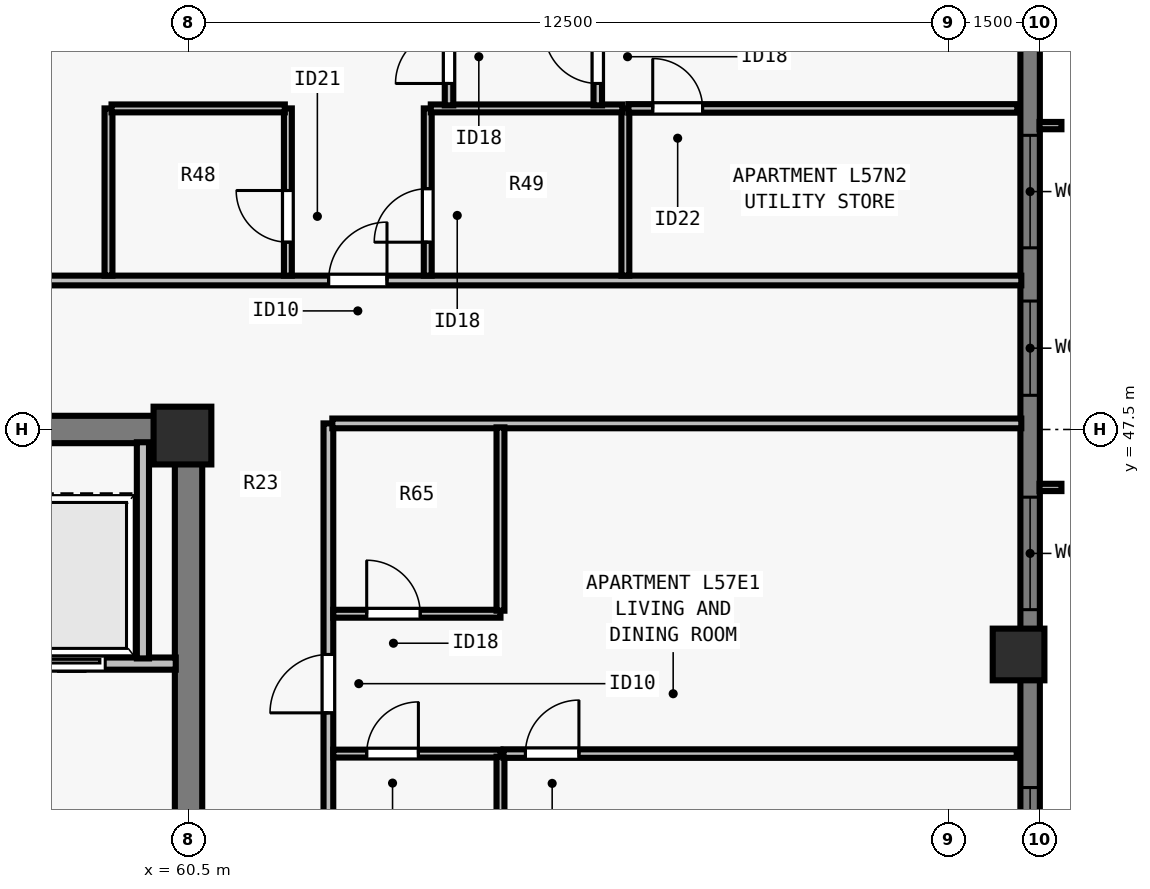
"""IFC4 building model, lengths in metres.
Left out: names, types, materials, properties, quantities, classifications, styles, units other than length and angle.
Written with IfcOpenShell. Run it as: python <this file> out.ifc"""

import sys

from ifc_helpers import new_model, si_unit, direction, frame, frame_2d, origin, origin_2d, place, context, subcontext, project, spatial, rectangle, extrude, element, fill, save


model = new_model("IFC4")
c1 = context("Model", 3, precision=1e-05, world=origin(), true_north=direction((0.0, 1.0)))
c2 = subcontext(c1, "Body", "Model", "MODEL_VIEW")
j1 = project(units=[si_unit("LENGTHUNIT", "METRE"), si_unit("PLANEANGLEUNIT", "RADIAN")], contexts=[c1])
p1 = place(None, origin())
s1 = spatial("IfcSite", under=j1, at=p1, CompositionType="ELEMENT")
p2 = place(p1, origin())
s2 = spatial("IfcBuilding", under=s1, at=p2, CompositionType="ELEMENT")
p3 = place(p2, frame((0.0, 0.0, 209.5)))
s3 = spatial("IfcBuildingStorey", under=s2, at=p3, CompositionType="ELEMENT", Elevation=209.5)
p4 = place(p3, frame((60.4, 47.4, 0.0), z_axis=(0.0, 0.0, 1.0), x_axis=(1.0, 0.0, 0.0)))
e1 = element("IfcColumn", 1, at=p4, inside=s3, PredefinedType="COLUMN", context=c2, shape_type="SweptSolid", body=[
    extrude(rectangle(XDim=0.95, YDim=0.95, at=origin_2d()), origin(), (0.0, 0.0, 1.0), 3.5),
])
p5 = place(p3, frame((74.15, 43.8, 0.0), z_axis=(0.0, 0.0, 1.0), x_axis=(0.0, 1.0, 0.0)))
e2 = element("IfcColumn", 2, at=p5, inside=s3, PredefinedType="COLUMN", context=c2, shape_type="SweptSolid", body=[
    extrude(rectangle(XDim=0.85, YDim=0.85, at=origin_2d()), origin(), (0.0, 0.0, 1.0), 3.5),
])
p6 = place(p3, frame((74.34, 56.5, 0.0), z_axis=(0.0, 0.0, 1.0), x_axis=(0.0, -1.0, 0.0)))
e3 = element("IfcWall", 3, at=p6, inside=s3, PredefinedType="SOLIDWALL", context=c2, shape_type="SweptSolid", body=[
    extrude(rectangle(XDim=34.702, YDim=0.32, at=frame_2d((17.351, 0.0))), origin(), (0.0, 0.0, 1.0), 3.29),
])
p7 = place(p6, frame((4.163, 0.0, 0.8)))
e4 = element("IfcOpeningElement", 4, at=p7, cuts=e3, PredefinedType="OPENING", context=c2, shape_type="SweptSolid", body=[
    extrude(rectangle(XDim=1.85, YDim=1.678, at=frame_2d((0.925, 0.839))), frame((0.0, 0.17, 0.0), z_axis=(0.0, -1.0, 0.0), x_axis=(1.0, 0.0, 0.0)), (0.0, 0.0, 1.0), 0.34),
])
p8 = place(p6, frame((6.888, 0.0, 0.8)))
e5 = element("IfcOpeningElement", 5, at=p8, cuts=e3, PredefinedType="OPENING", context=c2, shape_type="SweptSolid", body=[
    extrude(rectangle(XDim=1.55, YDim=1.678, at=frame_2d((0.775, 0.839))), frame((0.0, 0.17, 0.0), z_axis=(0.0, -1.0, 0.0), x_axis=(1.0, 0.0, 0.0)), (0.0, 0.0, 1.0), 0.34),
])
p9 = place(p6, frame((10.113, 0.0, 0.8)))
e6 = element("IfcOpeningElement", 6, at=p9, cuts=e3, PredefinedType="OPENING", context=c2, shape_type="SweptSolid", body=[
    extrude(rectangle(XDim=1.85, YDim=1.678, at=frame_2d((0.925, 0.839))), frame((0.0, 0.17, 0.0), z_axis=(0.0, -1.0, 0.0), x_axis=(1.0, 0.0, 0.0)), (0.0, 0.0, 1.0), 0.34),
])
p10 = place(p6, frame((14.888, 0.0, 0.8)))
e7 = element("IfcOpeningElement", 7, at=p10, cuts=e3, PredefinedType="OPENING", context=c2, shape_type="SweptSolid", body=[
    extrude(rectangle(XDim=1.55, YDim=1.678, at=frame_2d((0.775, 0.839))), frame((0.0, 0.17, 0.0), z_axis=(0.0, -1.0, 0.0), x_axis=(1.0, 0.0, 0.0)), (0.0, 0.0, 1.0), 0.34),
])
p11 = place(p6, frame((18.114, 0.0, 0.8)))
e8 = element("IfcOpeningElement", 8, at=p11, cuts=e3, PredefinedType="OPENING", context=c2, shape_type="SweptSolid", body=[
    extrude(rectangle(XDim=1.85, YDim=1.678, at=frame_2d((0.925, 0.839))), frame((0.0, 0.17, 0.0), z_axis=(0.0, -1.0, 0.0), x_axis=(1.0, 0.0, 0.0)), (0.0, 0.0, 1.0), 0.34),
])
p12 = place(p6, frame((23.614, 0.0, 0.8)))
e9 = element("IfcOpeningElement", 9, at=p12, cuts=e3, PredefinedType="OPENING", context=c2, shape_type="SweptSolid", body=[
    extrude(rectangle(XDim=1.85, YDim=1.678, at=frame_2d((0.925, 0.839))), frame((0.0, 0.17, 0.0), z_axis=(0.0, -1.0, 0.0), x_axis=(1.0, 0.0, 0.0)), (0.0, 0.0, 1.0), 0.34),
])
p13 = place(p6, frame((28.839, 0.0, 0.8)))
e10 = element("IfcOpeningElement", 10, at=p13, cuts=e3, PredefinedType="OPENING", context=c2, shape_type="SweptSolid", body=[
    extrude(rectangle(XDim=1.55, YDim=1.678, at=frame_2d((0.775, 0.839))), frame((0.0, 0.17, 0.0), z_axis=(0.0, -1.0, 0.0), x_axis=(1.0, 0.0, 0.0)), (0.0, 0.0, 1.0), 0.34),
])
p14 = place(p3, frame((43.275, 47.5, 0.0), z_axis=(0.0, 0.0, 1.0), x_axis=(1.0, 0.0, 0.0)))
e11 = element("IfcWall", 11, at=p14, inside=s3, PredefinedType="SHEAR", context=c2, shape_type="SweptSolid", body=[
    extrude(rectangle(XDim=17.45, YDim=0.45, at=frame_2d((8.725, 0.0))), origin(), (0.0, 0.0, 1.0), 3.29),
])
p15 = place(p3, frame((60.5, 40.8, 0.0), z_axis=(0.0, 0.0, 1.0), x_axis=(0.0, 1.0, 0.0)))
e12 = element("IfcWall", 12, at=p15, inside=s3, PredefinedType="SHEAR", context=c2, shape_type="SweptSolid", body=[
    extrude(rectangle(XDim=6.485, YDim=0.45, at=frame_2d((3.242, 0.0))), origin(), (0.0, 0.0, 1.0), 3.29),
])
p16 = place(p3, frame((56.735, 43.65, 0.0), z_axis=(0.0, 0.0, 1.0), x_axis=(1.0, 0.0, 0.0)))
e13 = element("IfcWall", 13, at=p16, inside=s3, PredefinedType="SOLIDWALL", context=c2, shape_type="SweptSolid", body=[
    extrude(rectangle(XDim=3.555, YDim=0.2, at=frame_2d((1.777, 0.0))), origin(), (0.0, 0.0, 1.0), 3.29),
])
p17 = place(p16, frame((1.295, 0.0, 0.0)))
e14 = element("IfcOpeningElement", 14, at=p17, cuts=e13, PredefinedType="OPENING", context=c2, shape_type="SweptSolid", body=[
    extrude(rectangle(XDim=1.1, YDim=2.2, at=frame_2d((0.55, 1.1))), frame((0.0, 0.11, 0.0), z_axis=(0.0, -1.0, 0.0), x_axis=(1.0, 0.0, 0.0)), (0.0, 0.0, 1.0), 0.22),
])
p18 = place(p3, frame((59.75, 43.735, 0.0), z_axis=(0.0, 0.0, 1.0), x_axis=(0.0, 1.0, 0.0)))
e15 = element("IfcWall", 15, at=p18, inside=s3, PredefinedType="SOLIDWALL", context=c2, shape_type="SweptSolid", body=[
    extrude(rectangle(XDim=3.555, YDim=0.2, at=frame_2d((1.777, 0.0))), origin(), (0.0, 0.0, 1.0), 3.29),
])
p19 = place(p3, frame((29.805, 49.95, 0.0), z_axis=(0.0, 0.0, 1.0), x_axis=(1.0, 0.0, 0.0)))
e16 = element("IfcWall", 16, at=p19, inside=s3, PredefinedType="PARTITIONING", context=c2, shape_type="SweptSolid", body=[
    extrude(rectangle(XDim=44.39, YDim=0.16, at=frame_2d((22.195, 0.0))), origin(), (0.0, 0.0, 1.0), 2.958),
])
p20 = place(p19, frame((10.919, 0.0, 0.0)))
e17 = element("IfcOpeningElement", 17, at=p20, cuts=e16, PredefinedType="OPENING", context=c2, shape_type="SweptSolid", body=[
    extrude(rectangle(XDim=0.96, YDim=2.18, at=frame_2d((0.48, 1.09))), frame((0.0, 0.09, 0.0), z_axis=(0.0, -1.0, 0.0), x_axis=(1.0, 0.0, 0.0)), (0.0, 0.0, 1.0), 0.18),
])
p21 = place(p19, frame((32.999, 0.0, 0.0)))
e18 = element("IfcOpeningElement", 18, at=p21, cuts=e16, PredefinedType="OPENING", context=c2, shape_type="SweptSolid", body=[
    extrude(rectangle(XDim=0.96, YDim=2.18, at=frame_2d((0.48, 1.09))), frame((0.0, 0.09, 0.0), z_axis=(0.0, -1.0, 0.0), x_axis=(1.0, 0.0, 0.0)), (0.0, 0.0, 1.0), 0.18),
])
p22 = place(p3, frame((62.8, 30.4, 0.0), z_axis=(0.0, 0.0, 1.0), x_axis=(0.0, 1.0, 0.0)))
e19 = element("IfcWall", 19, at=p22, inside=s3, PredefinedType="PARTITIONING", context=c2, shape_type="SweptSolid", body=[
    extrude(rectangle(XDim=17.2, YDim=0.16, at=frame_2d((8.6, 0.0))), origin(), (0.0, 0.0, 1.0), 3.29),
])
p23 = place(p22, frame((3.6, 0.0, 0.0)))
e20 = element("IfcOpeningElement", 20, at=p23, cuts=e19, PredefinedType="OPENING", context=c2, shape_type="SweptSolid", body=[
    extrude(rectangle(XDim=0.96, YDim=2.12, at=frame_2d((0.48, 1.06))), frame((0.0, 0.09, 0.0), z_axis=(0.0, -1.0, 0.0), x_axis=(1.0, 0.0, 0.0)), (0.0, 0.0, 1.0), 0.18),
])
p24 = place(p22, frame((12.44, 0.0, 0.0)))
e21 = element("IfcOpeningElement", 21, at=p24, cuts=e19, PredefinedType="OPENING", context=c2, shape_type="SweptSolid", body=[
    extrude(rectangle(XDim=0.96, YDim=2.18, at=frame_2d((0.48, 1.09))), frame((0.0, 0.09, 0.0), z_axis=(0.0, -1.0, 0.0), x_axis=(1.0, 0.0, 0.0)), (0.0, 0.0, 1.0), 0.18),
])
p25 = place(p3, frame((62.865, 47.6, 0.0), z_axis=(0.0, 0.0, 1.0), x_axis=(1.0, 0.0, 0.0)))
e22 = element("IfcWall", 22, at=p25, inside=s3, PredefinedType="PARTITIONING", context=c2, shape_type="SweptSolid", body=[
    extrude(rectangle(XDim=11.33, YDim=0.16, at=frame_2d((5.665, 0.0))), origin(), (0.0, 0.0, 1.0), 3.29),
])
p26 = place(p3, frame((59.184, 50.03, 0.0), z_axis=(0.0, 0.0, 1.0), x_axis=(0.0, 1.0, 0.0)))
e23 = element("IfcWall", 23, at=p26, inside=s3, PredefinedType="PLUMBINGWALL", context=c2, shape_type="SweptSolid", body=[
    extrude(rectangle(XDim=2.75, YDim=0.13, at=frame_2d((1.375, 0.0))), origin(), (0.0, 0.0, 1.0), 3.29),
])
p27 = place(p3, frame((62.134, 50.03, 0.0), z_axis=(0.0, 0.0, 1.0), x_axis=(0.0, 1.0, 0.0)))
e24 = element("IfcWall", 24, at=p27, inside=s3, PredefinedType="PLUMBINGWALL", context=c2, shape_type="SweptSolid", body=[
    extrude(rectangle(XDim=2.75, YDim=0.13, at=frame_2d((1.375, 0.0))), origin(), (0.0, 0.0, 1.0), 2.573),
])
p28 = place(p27, frame((0.55, 0.0, 0.0)))
e25 = element("IfcOpeningElement", 25, at=p28, cuts=e24, PredefinedType="OPENING", context=c2, shape_type="SweptSolid", body=[
    extrude(rectangle(XDim=0.85, YDim=2.08, at=frame_2d((0.425, 1.04))), frame((0.0, 0.075, 0.0), z_axis=(0.0, -1.0, 0.0), x_axis=(1.0, 0.0, 0.0)), (0.0, 0.0, 1.0), 0.15),
])
p29 = place(p3, frame((59.234, 52.78, 0.0), z_axis=(0.0, 0.0, 1.0), x_axis=(1.0, 0.0, 0.0)))
e26 = element("IfcWall", 26, at=p29, inside=s3, PredefinedType="PLUMBINGWALL", context=c2, shape_type="SweptSolid", body=[
    extrude(rectangle(XDim=2.85, YDim=0.13, at=frame_2d((1.425, 0.0))), origin(), (0.0, 0.0, 1.0), 3.29),
])
p30 = place(p3, frame((67.684, 50.03, 0.0), z_axis=(0.0, 0.0, 1.0), x_axis=(0.0, 1.0, 0.0)))
e27 = element("IfcWall", 27, at=p30, inside=s3, PredefinedType="PLUMBINGWALL", context=c2, shape_type="SweptSolid", body=[
    extrude(rectangle(XDim=2.75, YDim=0.13, at=frame_2d((1.375, 0.0))), origin(), (0.0, 0.0, 1.0), 3.29),
])
p31 = place(p3, frame((64.434, 50.03, 0.0), z_axis=(0.0, 0.0, 1.0), x_axis=(0.0, 1.0, 0.0)))
e28 = element("IfcWall", 28, at=p31, inside=s3, PredefinedType="PLUMBINGWALL", context=c2, shape_type="SweptSolid", body=[
    extrude(rectangle(XDim=2.75, YDim=0.13, at=frame_2d((1.375, 0.0))), origin(), (0.0, 0.0, 1.0), 3.29),
])
p32 = place(p31, frame((0.55, 0.0, 0.0)))
e29 = element("IfcOpeningElement", 29, at=p32, cuts=e28, PredefinedType="OPENING", context=c2, shape_type="SweptSolid", body=[
    extrude(rectangle(XDim=0.88, YDim=2.1, at=frame_2d((0.44, 1.05))), frame((0.0, 0.075, 0.0), z_axis=(0.0, -1.0, 0.0), x_axis=(1.0, 0.0, 0.0)), (0.0, 0.0, 1.0), 0.15),
])
p33 = place(p3, frame((64.484, 52.78, 0.0), z_axis=(0.0, 0.0, 1.0), x_axis=(1.0, 0.0, 0.0)))
e30 = element("IfcWall", 30, at=p33, inside=s3, PredefinedType="PLUMBINGWALL", context=c2, shape_type="SweptSolid", body=[
    extrude(rectangle(XDim=3.15, YDim=0.13, at=frame_2d((1.575, 0.0))), origin(), (0.0, 0.0, 1.0), 3.29),
])
p34 = place(p3, frame((67.23, 52.83, 0.0), z_axis=(0.0, 0.0, 1.0), x_axis=(0.0, 1.0, 0.0)))
e31 = element("IfcWall", 31, at=p34, inside=s3, PredefinedType="PARTITIONING", context=c2, shape_type="SweptSolid", body=[
    extrude(rectangle(XDim=8.29, YDim=0.14, at=frame_2d((4.145, 0.0))), origin(), (0.0, 0.0, 1.0), 2.573),
])
p35 = place(p34, frame((0.36, 0.0, 0.0)))
e32 = element("IfcOpeningElement", 32, at=p35, cuts=e31, PredefinedType="OPENING", context=c2, shape_type="SweptSolid", body=[
    extrude(rectangle(XDim=0.88, YDim=2.1, at=frame_2d((0.44, 1.05))), frame((0.0, 0.08, 0.0), z_axis=(0.0, -1.0, 0.0), x_axis=(1.0, 0.0, 0.0)), (0.0, 0.0, 1.0), 0.16),
])
p36 = place(p3, frame((67.734, 52.78, 0.0), z_axis=(0.0, 0.0, 1.0), x_axis=(1.0, 0.0, 0.0)))
e33 = element("IfcWall", 33, at=p36, inside=s3, PredefinedType="PARTITIONING", context=c2, shape_type="SweptSolid", body=[
    extrude(rectangle(XDim=6.396, YDim=0.14, at=frame_2d((3.198, 0.0))), origin(), (0.0, 0.0, 1.0), 2.958),
])
p37 = place(p36, frame((0.4, 0.0, 0.0)))
e34 = element("IfcOpeningElement", 34, at=p37, cuts=e33, PredefinedType="OPENING", context=c2, shape_type="SweptSolid", body=[
    extrude(rectangle(XDim=0.82, YDim=2.1, at=frame_2d((0.41, 1.05))), frame((0.0, 0.08, 0.0), z_axis=(0.0, -1.0, 0.0), x_axis=(1.0, 0.0, 0.0)), (0.0, 0.0, 1.0), 0.16),
])
p38 = place(p3, frame((64.784, 52.83, 0.0), z_axis=(0.0, 0.0, 1.0), x_axis=(0.0, 1.0, 0.0)))
e35 = element("IfcWall", 35, at=p38, inside=s3, PredefinedType="PARTITIONING", context=c2, shape_type="SweptSolid", body=[
    extrude(rectangle(XDim=8.29, YDim=0.14, at=frame_2d((4.145, 0.0))), origin(), (0.0, 0.0, 1.0), 2.573),
])
p39 = place(p38, frame((0.36, 0.0, 0.0)))
e36 = element("IfcOpeningElement", 36, at=p39, cuts=e35, PredefinedType="OPENING", context=c2, shape_type="SweptSolid", body=[
    extrude(rectangle(XDim=0.88, YDim=2.1, at=frame_2d((0.44, 1.05))), frame((0.0, 0.08, 0.0), z_axis=(0.0, -1.0, 0.0), x_axis=(1.0, 0.0, 0.0)), (0.0, 0.0, 1.0), 0.16),
])
p40 = place(p3, frame((62.88, 42.17, 0.0), z_axis=(0.0, 0.0, 1.0), x_axis=(1.0, 0.0, 0.0)))
e37 = element("IfcWall", 37, at=p40, inside=s3, PredefinedType="PLUMBINGWALL", context=c2, shape_type="SweptSolid", body=[
    extrude(rectangle(XDim=2.75, YDim=0.13, at=frame_2d((1.375, 0.0))), origin(), (0.0, 0.0, 1.0), 3.29),
])
p41 = place(p40, frame((0.55, 0.0, 0.0)))
e38 = element("IfcOpeningElement", 38, at=p41, cuts=e37, PredefinedType="OPENING", context=c2, shape_type="SweptSolid", body=[
    extrude(rectangle(XDim=0.85, YDim=2.08, at=frame_2d((0.425, 1.04))), frame((0.0, 0.075, 0.0), z_axis=(0.0, -1.0, 0.0), x_axis=(1.0, 0.0, 0.0)), (0.0, 0.0, 1.0), 0.15),
])
p42 = place(p3, frame((65.63, 39.18, 0.0), z_axis=(0.0, 0.0, 1.0), x_axis=(0.0, 1.0, 0.0)))
e39 = element("IfcWall", 39, at=p42, inside=s3, PredefinedType="PLUMBINGWALL", context=c2, shape_type="SweptSolid", body=[
    extrude(rectangle(XDim=2.94, YDim=0.13, at=frame_2d((1.47, 0.0))), origin(), (0.0, 0.0, 1.0), 3.29),
])
p43 = place(p3, frame((62.88, 44.47, 0.0), z_axis=(0.0, 0.0, 1.0), x_axis=(1.0, 0.0, 0.0)))
e40 = element("IfcWall", 40, at=p43, inside=s3, PredefinedType="PLUMBINGWALL", context=c2, shape_type="SweptSolid", body=[
    extrude(rectangle(XDim=2.75, YDim=0.13, at=frame_2d((1.375, 0.0))), origin(), (0.0, 0.0, 1.0), 3.29),
])
p44 = place(p43, frame((0.55, 0.0, 0.0)))
e41 = element("IfcOpeningElement", 41, at=p44, cuts=e40, PredefinedType="OPENING", context=c2, shape_type="SweptSolid", body=[
    extrude(rectangle(XDim=0.88, YDim=2.1, at=frame_2d((0.44, 1.05))), frame((0.0, 0.075, 0.0), z_axis=(0.0, -1.0, 0.0), x_axis=(1.0, 0.0, 0.0)), (0.0, 0.0, 1.0), 0.15),
])
p45 = place(p3, frame((65.63, 44.52, 0.0), z_axis=(0.0, 0.0, 1.0), x_axis=(0.0, 1.0, 0.0)))
e42 = element("IfcWall", 42, at=p45, inside=s3, PredefinedType="PLUMBINGWALL", context=c2, shape_type="SweptSolid", body=[
    extrude(rectangle(XDim=3.015, YDim=0.13, at=frame_2d((1.507, 0.0))), origin(), (0.0, 0.0, 1.0), 3.29),
])
p46 = place(p3, frame((65.68, 42.17, 0.0), z_axis=(0.0, 0.0, 1.0), x_axis=(1.0, 0.0, 0.0)))
e43 = element("IfcWall", 43, at=p46, inside=s3, PredefinedType="PARTITIONING", context=c2, shape_type="SweptSolid", body=[
    extrude(rectangle(XDim=8.44, YDim=0.14, at=frame_2d((4.22, 0.0))), origin(), (0.0, 0.0, 1.0), 3.29),
])
p47 = place(p46, frame((0.36, 0.0, 0.0)))
e44 = element("IfcOpeningElement", 44, at=p47, cuts=e43, PredefinedType="OPENING", context=c2, shape_type="SweptSolid", body=[
    extrude(rectangle(XDim=0.88, YDim=2.1, at=frame_2d((0.44, 1.05))), frame((0.0, 0.08, 0.0), z_axis=(0.0, -1.0, 0.0), x_axis=(1.0, 0.0, 0.0)), (0.0, 0.0, 1.0), 0.16),
])
p48 = place(p7, origin())
e45 = element("IfcWindow", 45, at=p48, inside=s3, PartitioningType="SINGLE_PANEL", PredefinedType="WINDOW", context=c2, shape_type="SweptSolid", body=[
    extrude(rectangle(XDim=1.85, YDim=1.678, at=frame_2d((0.925, 0.839))), frame((0.0, -0.05, 0.0), z_axis=(0.0, -1.0, 0.0), x_axis=(1.0, 0.0, 0.0)), (0.0, 0.0, 1.0), 0.06),
])
fill(e4, e45)
p49 = place(p8, origin())
e46 = element("IfcWindow", 46, at=p49, inside=s3, PartitioningType="SINGLE_PANEL", PredefinedType="WINDOW", context=c2, shape_type="SweptSolid", body=[
    extrude(rectangle(XDim=1.55, YDim=1.678, at=frame_2d((0.775, 0.839))), frame((0.0, -0.05, 0.0), z_axis=(0.0, -1.0, 0.0), x_axis=(1.0, 0.0, 0.0)), (0.0, 0.0, 1.0), 0.06),
])
fill(e5, e46)
p50 = place(p9, origin())
e47 = element("IfcWindow", 47, at=p50, inside=s3, PartitioningType="SINGLE_PANEL", PredefinedType="WINDOW", context=c2, shape_type="SweptSolid", body=[
    extrude(rectangle(XDim=1.85, YDim=1.678, at=frame_2d((0.925, 0.839))), frame((0.0, -0.05, 0.0), z_axis=(0.0, -1.0, 0.0), x_axis=(1.0, 0.0, 0.0)), (0.0, 0.0, 1.0), 0.06),
])
fill(e6, e47)
p51 = place(p10, origin())
e48 = element("IfcWindow", 48, at=p51, inside=s3, PartitioningType="SINGLE_PANEL", PredefinedType="WINDOW", context=c2, shape_type="SweptSolid", body=[
    extrude(rectangle(XDim=1.55, YDim=1.678, at=frame_2d((0.775, 0.839))), frame((0.0, -0.05, 0.0), z_axis=(0.0, -1.0, 0.0), x_axis=(1.0, 0.0, 0.0)), (0.0, 0.0, 1.0), 0.06),
])
fill(e7, e48)
p52 = place(p17, origin())
e49 = element("IfcDoor", 49, at=p52, inside=s3, OperationType="SLIDING_TO_LEFT", PredefinedType="DOOR", context=c2, shape_type="SweptSolid", body=[
    extrude(rectangle(XDim=1.1, YDim=2.2, at=frame_2d((0.55, 1.1))), frame((0.0, 0.025, 0.0), z_axis=(0.0, -1.0, 0.0), x_axis=(1.0, 0.0, 0.0)), (0.0, 0.0, 1.0), 0.05),
])
fill(e14, e49)
p53 = place(p28, origin())
e50 = element("IfcDoor", 50, at=p53, inside=s3, OperationType="SINGLE_SWING_RIGHT", PredefinedType="DOOR", context=c2, shape_type="SweptSolid", body=[
    extrude(rectangle(XDim=0.85, YDim=2.08, at=frame_2d((0.425, 1.04))), frame((0.0, 0.025, 0.0), z_axis=(0.0, -1.0, 0.0), x_axis=(1.0, 0.0, 0.0)), (0.0, 0.0, 1.0), 0.05),
])
fill(e25, e50)
p54 = place(p32, origin())
e51 = element("IfcDoor", 51, at=p54, inside=s3, OperationType="SINGLE_SWING_LEFT", PredefinedType="DOOR", context=c2, shape_type="SweptSolid", body=[
    extrude(rectangle(XDim=0.88, YDim=2.1, at=frame_2d((0.44, 1.05))), frame((0.0, 0.025, 0.0), z_axis=(0.0, -1.0, 0.0), x_axis=(1.0, 0.0, 0.0)), (0.0, 0.0, 1.0), 0.05),
])
fill(e29, e51)
p55 = place(p37, origin())
e52 = element("IfcDoor", 52, at=p55, inside=s3, OperationType="SINGLE_SWING_LEFT", PredefinedType="DOOR", context=c2, shape_type="SweptSolid", body=[
    extrude(rectangle(XDim=0.82, YDim=2.1, at=frame_2d((0.41, 1.05))), frame((0.0, 0.025, 0.0), z_axis=(0.0, -1.0, 0.0), x_axis=(1.0, 0.0, 0.0)), (0.0, 0.0, 1.0), 0.05),
])
fill(e34, e52)
p56 = place(p35, origin())
e53 = element("IfcDoor", 53, at=p56, inside=s3, OperationType="SINGLE_SWING_RIGHT", PredefinedType="DOOR", context=c2, shape_type="SweptSolid", body=[
    extrude(rectangle(XDim=0.88, YDim=2.1, at=frame_2d((0.44, 1.05))), frame((0.0, 0.025, 0.0), z_axis=(0.0, -1.0, 0.0), x_axis=(1.0, 0.0, 0.0)), (0.0, 0.0, 1.0), 0.05),
])
fill(e32, e53)
p57 = place(p39, origin())
e54 = element("IfcDoor", 54, at=p57, inside=s3, OperationType="SINGLE_SWING_LEFT", PredefinedType="DOOR", context=c2, shape_type="SweptSolid", body=[
    extrude(rectangle(XDim=0.88, YDim=2.1, at=frame_2d((0.44, 1.05))), frame((0.0, 0.025, 0.0), z_axis=(0.0, -1.0, 0.0), x_axis=(1.0, 0.0, 0.0)), (0.0, 0.0, 1.0), 0.05),
])
fill(e36, e54)
p58 = place(p21, origin())
e55 = element("IfcDoor", 55, at=p58, inside=s3, OperationType="SINGLE_SWING_RIGHT", PredefinedType="DOOR", context=c2, shape_type="SweptSolid", body=[
    extrude(rectangle(XDim=0.96, YDim=2.18, at=frame_2d((0.48, 1.09))), frame((0.0, 0.025, 0.0), z_axis=(0.0, -1.0, 0.0), x_axis=(1.0, 0.0, 0.0)), (0.0, 0.0, 1.0), 0.05),
])
fill(e18, e55)
p59 = place(p41, origin())
e56 = element("IfcDoor", 56, at=p59, inside=s3, OperationType="SINGLE_SWING_RIGHT", PredefinedType="DOOR", context=c2, shape_type="SweptSolid", body=[
    extrude(rectangle(XDim=0.85, YDim=2.08, at=frame_2d((0.425, 1.04))), frame((0.0, 0.025, 0.0), z_axis=(0.0, -1.0, 0.0), x_axis=(1.0, 0.0, 0.0)), (0.0, 0.0, 1.0), 0.05),
])
fill(e38, e56)
p60 = place(p44, origin())
e57 = element("IfcDoor", 57, at=p60, inside=s3, OperationType="SINGLE_SWING_LEFT", PredefinedType="DOOR", context=c2, shape_type="SweptSolid", body=[
    extrude(rectangle(XDim=0.88, YDim=2.1, at=frame_2d((0.44, 1.05))), frame((0.0, 0.025, 0.0), z_axis=(0.0, -1.0, 0.0), x_axis=(1.0, 0.0, 0.0)), (0.0, 0.0, 1.0), 0.05),
])
fill(e41, e57)
p61 = place(p47, origin())
e58 = element("IfcDoor", 58, at=p61, inside=s3, OperationType="SINGLE_SWING_RIGHT", PredefinedType="DOOR", context=c2, shape_type="SweptSolid", body=[
    extrude(rectangle(XDim=0.88, YDim=2.1, at=frame_2d((0.44, 1.05))), frame((0.0, 0.025, 0.0), z_axis=(0.0, -1.0, 0.0), x_axis=(1.0, 0.0, 0.0)), (0.0, 0.0, 1.0), 0.05),
])
fill(e44, e58)
p62 = place(p24, origin())
e59 = element("IfcDoor", 59, at=p62, inside=s3, OperationType="SINGLE_SWING_LEFT", PredefinedType="DOOR", context=c2, shape_type="SweptSolid", body=[
    extrude(rectangle(XDim=0.96, YDim=2.18, at=frame_2d((0.48, 1.09))), frame((0.0, 0.025, 0.0), z_axis=(0.0, -1.0, 0.0), x_axis=(1.0, 0.0, 0.0)), (0.0, 0.0, 1.0), 0.05),
])
fill(e21, e59)
save(model, sys.argv[1])
